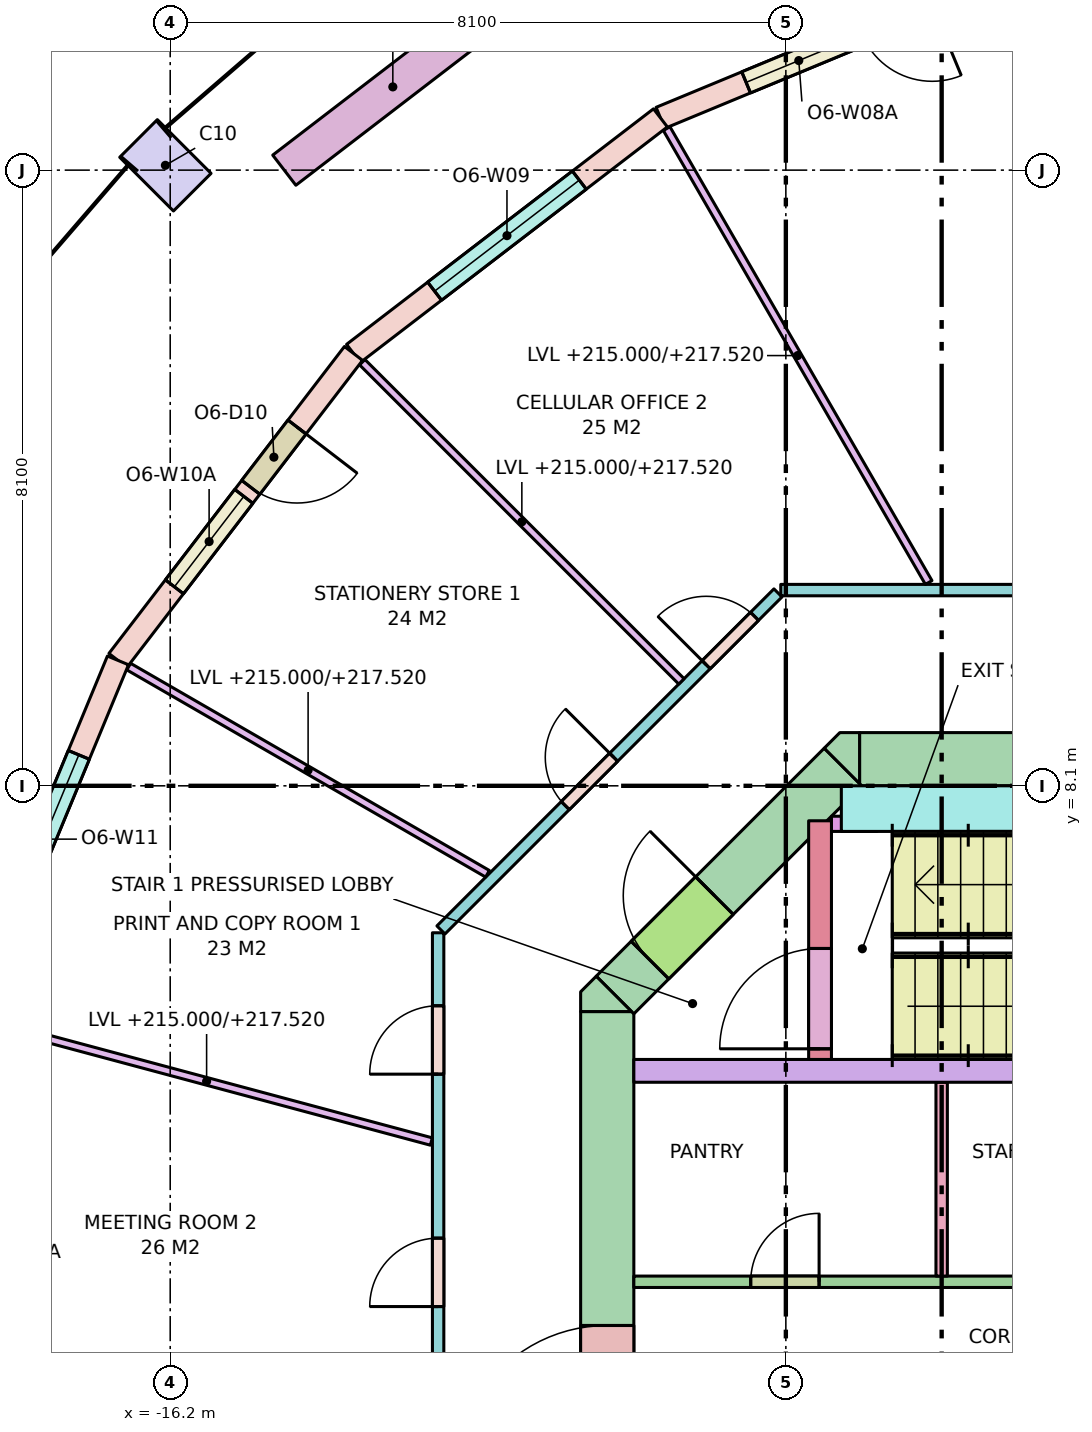
"""IFC4 building model, lengths in metres.
Left out: names, types, materials, properties, quantities, classifications, styles, units other than length and angle.
Written with IfcOpenShell. Run it as: python <this file> out.ifc"""

import sys

from ifc_helpers import new_model, si_unit, direction, frame, frame_2d, origin, origin_2d, place, context, subcontext, project, spatial, polyline, rectangle, outline, extrude, element, fill, save


model = new_model("IFC4")
c1 = context("Model", 3, precision=1e-05, world=origin(), true_north=direction((0.0, 1.0)))
c2 = subcontext(c1, "Body", "Model", "MODEL_VIEW")
j1 = project(units=[si_unit("LENGTHUNIT", "METRE"), si_unit("PLANEANGLEUNIT", "RADIAN")], contexts=[c1])
p1 = place(None, origin())
s1 = spatial("IfcSite", under=j1, at=p1, CompositionType="ELEMENT")
p2 = place(p1, origin())
s2 = spatial("IfcBuilding", under=s1, at=p2, CompositionType="ELEMENT")
p3 = place(p2, frame((0.0, 0.0, 215.0)))
s3 = spatial("IfcBuildingStorey", under=s2, at=p3, CompositionType="ELEMENT", Elevation=215.0)
p4 = place(p3, frame((-16.263, 16.263, 0.0), z_axis=(0.0, 0.0, 1.0), x_axis=(-0.707106781187, -0.707106781187, 0.0)))
e1 = element("IfcColumn", 1, at=p4, inside=s3, PredefinedType="COLUMN", context=c2, shape_type="SweptSolid", body=[
    extrude(rectangle(XDim=0.7, YDim=1.0, at=origin_2d()), origin(), (0.0, 0.0, 1.0), 3.7),
])
p5 = place(p3, frame((-7.13, 8.45, -0.28), z_axis=(0.0, 0.0, 1.0), x_axis=(1.0, 0.0, 0.0)))
e2 = element("IfcWall", 2, at=p5, inside=s3, PredefinedType="SHEAR", context=c2, shape_type="SweptSolid", body=[
    extrude(rectangle(XDim=14.26, YDim=0.7, at=frame_2d((7.13, 0.0))), origin(), (0.0, 0.0, 1.0), 3.7),
])
p6 = place(p5, frame((5.48, 0.0, 0.28)))
e3 = element("IfcOpeningElement", 3, at=p6, cuts=e2, PredefinedType="OPENING", context=c2, shape_type="SweptSolid", body=[
    extrude(rectangle(XDim=0.7, YDim=2.1, at=frame_2d((0.35, 1.05))), frame((0.0, 0.36, 0.0), z_axis=(0.0, -1.0, 0.0), x_axis=(1.0, 0.0, 0.0)), (0.0, 0.0, 1.0), 0.72),
])
p7 = place(p5, frame((7.155, 0.0, 0.28)))
e4 = element("IfcOpeningElement", 4, at=p7, cuts=e2, PredefinedType="OPENING", context=c2, shape_type="SweptSolid", body=[
    extrude(rectangle(XDim=0.9, YDim=2.1, at=frame_2d((0.45, 1.05))), frame((0.0, 0.36, 0.0), z_axis=(0.0, -1.0, 0.0), x_axis=(1.0, 0.0, 0.0)), (0.0, 0.0, 1.0), 0.72),
])
p8 = place(p3, frame((-10.45, -5.13, -0.28), z_axis=(0.0, 0.0, 1.0), x_axis=(0.0, 1.0, 0.0)))
e5 = element("IfcWall", 5, at=p8, inside=s3, PredefinedType="SHEAR", context=c2, shape_type="SweptSolid", body=[
    extrude(rectangle(XDim=10.26, YDim=0.7, at=frame_2d((5.13, 0.0))), origin(), (0.0, 0.0, 1.0), 3.7),
])
p9 = place(p8, frame((4.13, 0.0, 0.28)))
e6 = element("IfcOpeningElement", 6, at=p9, cuts=e5, PredefinedType="OPENING", context=c2, shape_type="SweptSolid", body=[
    extrude(rectangle(XDim=2.0, YDim=2.1, at=frame_2d((1.0, 1.05))), frame((0.0, 0.36, 0.0), z_axis=(0.0, -1.0, 0.0), x_axis=(1.0, 0.0, 0.0)), (0.0, 0.0, 1.0), 0.72),
])
p10 = place(p3, frame((-10.347, 5.347, -0.28), z_axis=(0.0, 0.0, 1.0), x_axis=(0.707106781187, 0.707106781187, 0.0)))
e7 = element("IfcWall", 7, at=p10, inside=s3, PredefinedType="SHEAR", context=c2, shape_type="SweptSolid", body=[
    extrude(rectangle(XDim=4.243, YDim=0.7, at=frame_2d((2.121, 0.0))), origin(), (0.0, 0.0, 1.0), 3.7),
])
p11 = place(p10, frame((0.65, 0.0, 0.28)))
e8 = element("IfcOpeningElement", 8, at=p11, cuts=e7, PredefinedType="OPENING", context=c2, shape_type="SweptSolid", body=[
    extrude(rectangle(XDim=1.2, YDim=2.1, at=frame_2d((0.6, 1.05))), frame((0.0, 0.36, 0.0), z_axis=(0.0, -1.0, 0.0), x_axis=(1.0, 0.0, 0.0)), (0.0, 0.0, 1.0), 0.72),
])
p12 = place(p3, frame((0.0, 0.0, -0.28)))
e9 = element("IfcWall", 9, at=p12, inside=s3, PredefinedType="SHEAR", context=c2, shape_type="SweptSolid", body=[
    extrude(outline(polyline([(-10.595, 5.595), (-10.595, 5.595), (-10.595, 5.595), (-10.13, 5.13), (-10.8, 5.13), (-10.8, 5.13), (-10.8, 5.39), (-10.595, 5.595)])), origin(), (0.0, 0.0, 1.0), 3.7),
])
p13 = place(p3, frame((0.0, 0.0, -0.28)))
e10 = element("IfcWall", 10, at=p13, inside=s3, PredefinedType="SHEAR", context=c2, shape_type="SweptSolid", body=[
    extrude(outline(polyline([(-7.39, 8.8), (-7.13, 8.8), (-7.13, 8.8), (-7.13, 8.13), (-7.595, 8.595), (-7.595, 8.595), (-7.595, 8.595), (-7.39, 8.8)])), origin(), (0.0, 0.0, 1.0), 3.7),
])
p14 = place(p3, frame((-10.1, 4.35, 0.0), z_axis=(0.0, 0.0, 1.0), x_axis=(1.0, 0.0, 0.0)))
e11 = element("IfcWall", 11, at=p14, inside=s3, PredefinedType="SOLIDWALL", context=c2, shape_type="SweptSolid", body=[
    extrude(rectangle(XDim=8.1, YDim=0.3, at=frame_2d((4.05, 0.0))), origin(), (0.0, 0.0, 1.0), 3.42),
])
p15 = place(p3, frame((-7.65, 4.5, 0.0), z_axis=(0.0, 0.0, 1.0), x_axis=(0.0, 1.0, 0.0)))
e12 = element("IfcWall", 12, at=p15, inside=s3, PredefinedType="SHEAR", context=c2, shape_type="SweptSolid", body=[
    extrude(rectangle(XDim=3.14, YDim=0.3, at=frame_2d((1.57, 0.0))), origin(), (0.0, 0.0, 1.0), 3.42),
])
p16 = place(p15, frame((0.14, 0.0, 0.0)))
e13 = element("IfcOpeningElement", 13, at=p16, cuts=e12, PredefinedType="OPENING", context=c2, shape_type="SweptSolid", body=[
    extrude(rectangle(XDim=1.32, YDim=2.1, at=frame_2d((0.66, 1.05))), frame((0.0, 0.16, 0.0), z_axis=(0.0, -1.0, 0.0), x_axis=(1.0, 0.0, 0.0)), (0.0, 0.0, 1.0), 0.32),
])
p17 = place(p3, frame((-7.37, 7.8, 0.0), z_axis=(0.0, 0.0, 1.0), x_axis=(1.0, 0.0, 0.0)))
e14 = element("IfcWall", 14, at=p17, inside=s3, PredefinedType="SHEAR", context=c2, shape_type="SweptSolid", body=[
    extrude(rectangle(XDim=5.37, YDim=0.6, at=frame_2d((2.685, 0.0))), origin(), (0.0, 0.0, 1.0), 3.42),
])
p18 = place(p3, frame((-7.5, 7.6, 0.0), z_axis=(0.0, 0.0, 1.0), x_axis=(1.0, 0.0, 0.0)))
e15 = element("IfcWall", 15, at=p18, inside=s3, PredefinedType="SHEAR", context=c2, shape_type="SweptSolid", body=[
    extrude(rectangle(XDim=0.6, YDim=0.2, at=frame_2d((0.3, 0.0))), origin(), (0.0, 0.0, 1.0), 3.42),
])
p19 = place(p3, frame((-5.047, 18.836, 0.0), z_axis=(0.0, 0.0, 1.0), x_axis=(-0.923862504675, -0.382724538613, 0.0)))
e16 = element("IfcWall", 16, at=p19, inside=s3, PredefinedType="STANDARD", context=c2, shape_type="SweptSolid", body=[
    extrude(rectangle(XDim=5.091, YDim=0.3, at=frame_2d((2.545, 0.0))), origin(), (0.0, 0.0, 1.0), 3.42),
])
p20 = place(p19, frame((1.22, 0.0, 0.0)))
e17 = element("IfcOpeningElement", 17, at=p20, cuts=e16, PredefinedType="OPENING", context=c2, shape_type="SweptSolid", body=[
    extrude(rectangle(XDim=1.0, YDim=2.4, at=frame_2d((0.5, 1.2))), frame((0.0, 0.16, 0.0), z_axis=(0.0, -1.0, 0.0), x_axis=(1.0, 0.0, 0.0)), (0.0, 0.0, 1.0), 0.32),
])
p21 = place(p19, frame((2.37, 0.0, 0.8)))
e18 = element("IfcOpeningElement", 18, at=p21, cuts=e16, PredefinedType="OPENING", context=c2, shape_type="SweptSolid", body=[
    extrude(rectangle(XDim=1.5, YDim=2.4, at=frame_2d((0.75, 1.2))), frame((0.0, 0.16, 0.0), z_axis=(0.0, -1.0, 0.0), x_axis=(1.0, 0.0, 0.0)), (0.0, 0.0, 1.0), 0.32),
])
p22 = place(p3, frame((-9.75, 16.887, 0.0), z_axis=(0.0, 0.0, 1.0), x_axis=(-0.79335619014, -0.608757714995, 0.0)))
e19 = element("IfcWall", 19, at=p22, inside=s3, PredefinedType="STANDARD", context=c2, shape_type="SweptSolid", body=[
    extrude(rectangle(XDim=5.091, YDim=0.3, at=frame_2d((2.545, 0.0))), origin(), (0.0, 0.0, 1.0), 3.42),
])
p23 = place(p22, frame((1.345, 0.0, 0.8)))
e20 = element("IfcOpeningElement", 20, at=p23, cuts=e19, PredefinedType="OPENING", context=c2, shape_type="SweptSolid", body=[
    extrude(rectangle(XDim=2.4, YDim=2.4, at=frame_2d((1.2, 1.2))), frame((0.0, 0.16, 0.0), z_axis=(0.0, -1.0, 0.0), x_axis=(1.0, 0.0, 0.0)), (0.0, 0.0, 1.0), 0.32),
])
p24 = place(p3, frame((-13.789, 13.789, 0.0), z_axis=(0.0, 0.0, 1.0), x_axis=(-0.608757714995, -0.79335619014, 0.0)))
e21 = element("IfcWall", 21, at=p24, inside=s3, PredefinedType="STANDARD", context=c2, shape_type="SweptSolid", body=[
    extrude(rectangle(XDim=5.091, YDim=0.3, at=frame_2d((2.545, 0.0))), origin(), (0.0, 0.0, 1.0), 3.42),
])
p25 = place(p24, frame((1.22, 0.0, 0.0)))
e22 = element("IfcOpeningElement", 22, at=p25, cuts=e21, PredefinedType="OPENING", context=c2, shape_type="SweptSolid", body=[
    extrude(rectangle(XDim=1.0, YDim=2.4, at=frame_2d((0.5, 1.2))), frame((0.0, 0.16, 0.0), z_axis=(0.0, -1.0, 0.0), x_axis=(1.0, 0.0, 0.0)), (0.0, 0.0, 1.0), 0.32),
])
p26 = place(p24, frame((2.37, 0.0, 0.8)))
e23 = element("IfcOpeningElement", 23, at=p26, cuts=e21, PredefinedType="OPENING", context=c2, shape_type="SweptSolid", body=[
    extrude(rectangle(XDim=1.5, YDim=2.4, at=frame_2d((0.75, 1.2))), frame((0.0, 0.16, 0.0), z_axis=(0.0, -1.0, 0.0), x_axis=(1.0, 0.0, 0.0)), (0.0, 0.0, 1.0), 0.32),
])
p27 = place(p3, frame((-16.887, 9.75, 0.0), z_axis=(0.0, 0.0, 1.0), x_axis=(-0.382724538613, -0.923862504675, 0.0)))
e24 = element("IfcWall", 24, at=p27, inside=s3, PredefinedType="STANDARD", context=c2, shape_type="SweptSolid", body=[
    extrude(rectangle(XDim=5.091, YDim=0.3, at=frame_2d((2.545, 0.0))), origin(), (0.0, 0.0, 1.0), 3.42),
])
p28 = place(p27, frame((1.345, 0.0, 0.8)))
e25 = element("IfcOpeningElement", 25, at=p28, cuts=e24, PredefinedType="OPENING", context=c2, shape_type="SweptSolid", body=[
    extrude(rectangle(XDim=2.4, YDim=2.4, at=frame_2d((1.2, 1.2))), frame((0.0, 0.16, 0.0), z_axis=(0.0, -1.0, 0.0), x_axis=(1.0, 0.0, 0.0)), (0.0, 0.0, 1.0), 0.32),
])
p29 = place(p3, frame((-11.843, 18.391, 0.0), z_axis=(0.0, 0.0, 1.0), x_axis=(-0.793326845617, -0.608795955984, 0.0)))
e26 = element("IfcWall", 26, at=p29, inside=s3, PredefinedType="PARAPET", context=c2, shape_type="SweptSolid", body=[
    extrude(rectangle(XDim=3.6, YDim=0.5, at=frame_2d((1.8, 0.0))), origin(), (0.0, 0.0, 1.0), 0.9),
])
p30 = place(p3, frame((-6.05, 1.65, 0.0), z_axis=(0.0, 0.0, 1.0), x_axis=(0.0, 1.0, 0.0)))
e27 = element("IfcWall", 27, at=p30, inside=s3, PredefinedType="PARTITIONING", context=c2, shape_type="SweptSolid", body=[
    extrude(rectangle(XDim=2.55, YDim=0.15, at=frame_2d((1.275, 0.0))), origin(), (0.0, 0.0, 1.0), 3.42),
])
p31 = place(p3, frame((-10.1, 1.575, 0.0), z_axis=(0.0, 0.0, 1.0), x_axis=(1.0, 0.0, 0.0)))
e28 = element("IfcWall", 28, at=p31, inside=s3, PredefinedType="PARTITIONING", context=c2, shape_type="SweptSolid", body=[
    extrude(rectangle(XDim=8.1, YDim=0.15, at=frame_2d((4.05, 0.0))), origin(), (0.0, 0.0, 1.0), 3.42),
])
p32 = place(p31, frame((1.538, 0.0, 0.0)))
e29 = element("IfcOpeningElement", 29, at=p32, cuts=e28, PredefinedType="OPENING", context=c2, shape_type="SweptSolid", body=[
    extrude(rectangle(XDim=0.9, YDim=2.1, at=frame_2d((0.45, 1.05))), frame((0.0, 0.085, 0.0), z_axis=(0.0, -1.0, 0.0), x_axis=(1.0, 0.0, 0.0)), (0.0, 0.0, 1.0), 0.17),
])
p33 = place(p31, frame((5.663, 0.0, 0.0)))
e30 = element("IfcOpeningElement", 30, at=p33, cuts=e28, PredefinedType="OPENING", context=c2, shape_type="SweptSolid", body=[
    extrude(rectangle(XDim=0.9, YDim=2.1, at=frame_2d((0.45, 1.05))), frame((0.0, 0.085, 0.0), z_axis=(0.0, -1.0, 0.0), x_axis=(1.0, 0.0, 0.0)), (0.0, 0.0, 1.0), 0.17),
])
p34 = place(p3, frame((-12.675, -6.167, 0.0), z_axis=(0.0, 0.0, 1.0), x_axis=(0.0, 1.0, 0.0)))
e31 = element("IfcWall", 31, at=p34, inside=s3, PredefinedType="PARTITIONING", context=c2, shape_type="SweptSolid", body=[
    extrude(rectangle(XDim=12.333, YDim=0.15, at=frame_2d((6.167, 0.0))), origin(), (0.0, 0.0, 1.0), 2.52),
])
p35 = place(p34, frame((10.473, 0.0, 0.0)))
e32 = element("IfcOpeningElement", 32, at=p35, cuts=e31, PredefinedType="OPENING", context=c2, shape_type="SweptSolid", body=[
    extrude(rectangle(XDim=0.9, YDim=2.1, at=frame_2d((0.45, 1.05))), frame((0.0, 0.085, 0.0), z_axis=(0.0, -1.0, 0.0), x_axis=(1.0, 0.0, 0.0)), (0.0, 0.0, 1.0), 0.17),
])
p36 = place(p34, frame((7.416, 0.0, 0.0)))
e33 = element("IfcOpeningElement", 33, at=p36, cuts=e31, PredefinedType="OPENING", context=c2, shape_type="SweptSolid", body=[
    extrude(rectangle(XDim=0.9, YDim=2.1, at=frame_2d((0.45, 1.05))), frame((0.0, 0.085, 0.0), z_axis=(0.0, -1.0, 0.0), x_axis=(1.0, 0.0, 0.0)), (0.0, 0.0, 1.0), 0.17),
])
p37 = place(p34, frame((4.018, 0.0, 0.0)))
e34 = element("IfcOpeningElement", 34, at=p37, cuts=e31, PredefinedType="OPENING", context=c2, shape_type="SweptSolid", body=[
    extrude(rectangle(XDim=0.9, YDim=2.1, at=frame_2d((0.45, 1.05))), frame((0.0, 0.085, 0.0), z_axis=(0.0, -1.0, 0.0), x_axis=(1.0, 0.0, 0.0)), (0.0, 0.0, 1.0), 0.17),
])
p38 = place(p34, frame((0.46, 0.0, 0.0)))
e35 = element("IfcOpeningElement", 35, at=p38, cuts=e31, PredefinedType="OPENING", context=c2, shape_type="SweptSolid", body=[
    extrude(rectangle(XDim=1.8, YDim=2.1, at=frame_2d((0.9, 1.05))), frame((0.0, 0.085, 0.0), z_axis=(0.0, -1.0, 0.0), x_axis=(1.0, 0.0, 0.0)), (0.0, 0.0, 1.0), 0.17),
])
p39 = place(p3, frame((-12.638, 6.204, 0.0), z_axis=(0.0, 0.0, 1.0), x_axis=(0.707106781187, 0.707106781187, 0.0)))
e36 = element("IfcWall", 36, at=p39, inside=s3, PredefinedType="PARTITIONING", context=c2, shape_type="SweptSolid", body=[
    extrude(rectangle(XDim=6.271, YDim=0.15, at=frame_2d((3.135, 0.0))), origin(), (0.0, 0.0, 1.0), 2.52),
])
p40 = place(p39, frame((4.935, 0.0, 0.0)))
e37 = element("IfcOpeningElement", 37, at=p40, cuts=e36, PredefinedType="OPENING", context=c2, shape_type="SweptSolid", body=[
    extrude(rectangle(XDim=0.9, YDim=2.1, at=frame_2d((0.45, 1.05))), frame((0.0, 0.085, 0.0), z_axis=(0.0, -1.0, 0.0), x_axis=(1.0, 0.0, 0.0)), (0.0, 0.0, 1.0), 0.17),
])
p41 = place(p39, frame((2.314, 0.0, 0.0)))
e38 = element("IfcOpeningElement", 38, at=p41, cuts=e36, PredefinedType="OPENING", context=c2, shape_type="SweptSolid", body=[
    extrude(rectangle(XDim=0.9, YDim=2.1, at=frame_2d((0.45, 1.05))), frame((0.0, 0.085, 0.0), z_axis=(0.0, -1.0, 0.0), x_axis=(1.0, 0.0, 0.0)), (0.0, 0.0, 1.0), 0.17),
])
p42 = place(p3, frame((-8.167, 10.675, 0.0), z_axis=(0.0, 0.0, 1.0), x_axis=(1.0, 0.0, 0.0)))
e39 = element("IfcWall", 39, at=p42, inside=s3, PredefinedType="PARTITIONING", context=c2, shape_type="SweptSolid", body=[
    extrude(rectangle(XDim=16.333, YDim=0.15, at=frame_2d((8.167, 0.0))), origin(), (0.0, 0.0, 1.0), 2.52),
])
p43 = place(p42, frame((9.148, 0.0, 0.0)))
e40 = element("IfcOpeningElement", 40, at=p43, cuts=e39, PredefinedType="OPENING", context=c2, shape_type="SweptSolid", body=[
    extrude(rectangle(XDim=0.9, YDim=2.1, at=frame_2d((0.45, 1.05))), frame((0.0, 0.085, 0.0), z_axis=(0.0, -1.0, 0.0), x_axis=(1.0, 0.0, 0.0)), (0.0, 0.0, 1.0), 0.17),
])
p44 = place(p42, frame((4.581, 0.0, 0.0)))
e41 = element("IfcOpeningElement", 41, at=p44, cuts=e39, PredefinedType="OPENING", context=c2, shape_type="SweptSolid", body=[
    extrude(rectangle(XDim=1.0, YDim=2.1, at=frame_2d((0.5, 1.05))), frame((0.0, 0.085, 0.0), z_axis=(0.0, -1.0, 0.0), x_axis=(1.0, 0.0, 0.0)), (0.0, 0.0, 1.0), 0.17),
])
p45 = place(p3, frame((-6.221, 10.775, 0.0), z_axis=(0.0, 0.0, 1.0), x_axis=(-0.500015661236, 0.866016361577, 0.0)))
e42 = element("IfcWall", 42, at=p45, inside=s3, PredefinedType="PARTITIONING", context=c2, shape_type="SweptSolid", body=[
    extrude(rectangle(XDim=6.895, YDim=0.1, at=frame_2d((3.448, 0.0))), origin(), (0.0, 0.0, 1.0), 2.52),
])
p46 = place(p3, frame((-9.474, 9.474, 0.0), z_axis=(0.0, 0.0, 1.0), x_axis=(-0.707106781187, 0.707106781187, 0.0)))
e43 = element("IfcWall", 43, at=p46, inside=s3, PredefinedType="PARTITIONING", context=c2, shape_type="SweptSolid", body=[
    extrude(rectangle(XDim=5.938, YDim=0.1, at=frame_2d((2.969, 0.0))), origin(), (0.0, 0.0, 1.0), 2.52),
])
p47 = place(p3, frame((-12.025, 6.943, 0.0), z_axis=(0.0, 0.0, 1.0), x_axis=(-0.866029712004, 0.499992537871, 0.0)))
e44 = element("IfcWall", 44, at=p47, inside=s3, PredefinedType="PARTITIONING", context=c2, shape_type="SweptSolid", body=[
    extrude(rectangle(XDim=5.451, YDim=0.1, at=frame_2d((2.726, 0.0))), origin(), (0.0, 0.0, 1.0), 2.52),
])
p48 = place(p3, frame((-12.764, 3.42, 0.0), z_axis=(0.0, 0.0, 1.0), x_axis=(-0.965925800266, 0.258819142221, 0.0)))
e45 = element("IfcWall", 45, at=p48, inside=s3, PredefinedType="PARTITIONING", context=c2, shape_type="SweptSolid", body=[
    extrude(rectangle(XDim=6.122, YDim=0.1, at=frame_2d((3.061, 0.0))), origin(), (0.0, 0.0, 1.0), 2.52),
])
p49 = place(p21, origin())
e46 = element("IfcWindow", 46, at=p49, inside=s3, PartitioningType="SINGLE_PANEL", PredefinedType="WINDOW", context=c2, shape_type="SweptSolid", body=[
    extrude(rectangle(XDim=1.5, YDim=2.4, at=frame_2d((0.75, 1.2))), frame((0.0, 0.03, 0.0), z_axis=(0.0, -1.0, 0.0), x_axis=(1.0, 0.0, 0.0)), (0.0, 0.0, 1.0), 0.06),
])
fill(e18, e46)
p50 = place(p23, origin())
e47 = element("IfcWindow", 47, at=p50, inside=s3, PartitioningType="SINGLE_PANEL", PredefinedType="WINDOW", context=c2, shape_type="SweptSolid", body=[
    extrude(rectangle(XDim=2.4, YDim=2.4, at=frame_2d((1.2, 1.2))), frame((0.0, 0.03, 0.0), z_axis=(0.0, -1.0, 0.0), x_axis=(1.0, 0.0, 0.0)), (0.0, 0.0, 1.0), 0.06),
])
fill(e20, e47)
p51 = place(p25, origin())
e48 = element("IfcDoor", 48, at=p51, inside=s3, OperationType="SINGLE_SWING_LEFT", PredefinedType="DOOR", context=c2, shape_type="SweptSolid", body=[
    extrude(rectangle(XDim=1.0, YDim=2.4, at=frame_2d((0.5, 1.2))), frame((0.0, 0.025, 0.0), z_axis=(0.0, -1.0, 0.0), x_axis=(1.0, 0.0, 0.0)), (0.0, 0.0, 1.0), 0.05),
])
fill(e22, e48)
p52 = place(p26, origin())
e49 = element("IfcWindow", 49, at=p52, inside=s3, PartitioningType="SINGLE_PANEL", PredefinedType="WINDOW", context=c2, shape_type="SweptSolid", body=[
    extrude(rectangle(XDim=1.5, YDim=2.4, at=frame_2d((0.75, 1.2))), frame((0.0, 0.03, 0.0), z_axis=(0.0, -1.0, 0.0), x_axis=(1.0, 0.0, 0.0)), (0.0, 0.0, 1.0), 0.06),
])
fill(e23, e49)
p53 = place(p28, origin())
e50 = element("IfcWindow", 50, at=p53, inside=s3, PartitioningType="SINGLE_PANEL", PredefinedType="WINDOW", context=c2, shape_type="SweptSolid", body=[
    extrude(rectangle(XDim=2.4, YDim=2.4, at=frame_2d((1.2, 1.2))), frame((0.0, 0.03, 0.0), z_axis=(0.0, -1.0, 0.0), x_axis=(1.0, 0.0, 0.0)), (0.0, 0.0, 1.0), 0.06),
])
fill(e25, e50)
p54 = place(p16, origin())
e51 = element("IfcDoor", 51, at=p54, inside=s3, OperationType="DOUBLE_DOOR_SINGLE_SWING", PredefinedType="DOOR", context=c2, shape_type="SweptSolid", body=[
    extrude(rectangle(XDim=1.32, YDim=2.1, at=frame_2d((0.66, 1.05))), frame((0.0, 0.025, 0.0), z_axis=(0.0, -1.0, 0.0), x_axis=(1.0, 0.0, 0.0)), (0.0, 0.0, 1.0), 0.05),
])
fill(e13, e51)
p55 = place(p11, origin())
e52 = element("IfcDoor", 52, at=p55, inside=s3, OperationType="SINGLE_SWING_RIGHT", PredefinedType="DOOR", context=c2, shape_type="SweptSolid", body=[
    extrude(rectangle(XDim=1.2, YDim=2.1, at=frame_2d((0.6, 1.05))), frame((0.0, 0.025, 0.0), z_axis=(0.0, -1.0, 0.0), x_axis=(1.0, 0.0, 0.0)), (0.0, 0.0, 1.0), 0.05),
])
fill(e8, e52)
p56 = place(p9, origin())
e53 = element("IfcDoor", 53, at=p56, inside=s3, OperationType="DOUBLE_DOOR_SINGLE_SWING", PredefinedType="DOOR", context=c2, shape_type="SweptSolid", body=[
    extrude(rectangle(XDim=2.0, YDim=2.1, at=frame_2d((1.0, 1.05))), frame((0.0, 0.025, 0.0), z_axis=(0.0, -1.0, 0.0), x_axis=(1.0, 0.0, 0.0)), (0.0, 0.0, 1.0), 0.05),
])
fill(e6, e53)
p57 = place(p32, origin())
e54 = element("IfcDoor", 54, at=p57, inside=s3, OperationType="SINGLE_SWING_RIGHT", PredefinedType="DOOR", context=c2, shape_type="SweptSolid", body=[
    extrude(rectangle(XDim=0.9, YDim=2.1, at=frame_2d((0.45, 1.05))), frame((0.0, 0.025, 0.0), z_axis=(0.0, -1.0, 0.0), x_axis=(1.0, 0.0, 0.0)), (0.0, 0.0, 1.0), 0.05),
])
fill(e29, e54)
p58 = place(p40, origin())
e55 = element("IfcDoor", 55, at=p58, inside=s3, OperationType="SINGLE_SWING_LEFT", PredefinedType="DOOR", context=c2, shape_type="SweptSolid", body=[
    extrude(rectangle(XDim=0.9, YDim=2.1, at=frame_2d((0.45, 1.05))), frame((0.0, 0.025, 0.0), z_axis=(0.0, -1.0, 0.0), x_axis=(1.0, 0.0, 0.0)), (0.0, 0.0, 1.0), 0.05),
])
fill(e37, e55)
p59 = place(p41, origin())
e56 = element("IfcDoor", 56, at=p59, inside=s3, OperationType="SINGLE_SWING_RIGHT", PredefinedType="DOOR", context=c2, shape_type="SweptSolid", body=[
    extrude(rectangle(XDim=0.9, YDim=2.1, at=frame_2d((0.45, 1.05))), frame((0.0, 0.025, 0.0), z_axis=(0.0, -1.0, 0.0), x_axis=(1.0, 0.0, 0.0)), (0.0, 0.0, 1.0), 0.05),
])
fill(e38, e56)
p60 = place(p35, origin())
e57 = element("IfcDoor", 57, at=p60, inside=s3, OperationType="SINGLE_SWING_LEFT", PredefinedType="DOOR", context=c2, shape_type="SweptSolid", body=[
    extrude(rectangle(XDim=0.9, YDim=2.1, at=frame_2d((0.45, 1.05))), frame((0.0, 0.025, 0.0), z_axis=(0.0, -1.0, 0.0), x_axis=(1.0, 0.0, 0.0)), (0.0, 0.0, 1.0), 0.05),
])
fill(e32, e57)
p61 = place(p36, origin())
e58 = element("IfcDoor", 58, at=p61, inside=s3, OperationType="SINGLE_SWING_LEFT", PredefinedType="DOOR", context=c2, shape_type="SweptSolid", body=[
    extrude(rectangle(XDim=0.9, YDim=2.1, at=frame_2d((0.45, 1.05))), frame((0.0, 0.025, 0.0), z_axis=(0.0, -1.0, 0.0), x_axis=(1.0, 0.0, 0.0)), (0.0, 0.0, 1.0), 0.05),
])
fill(e33, e58)
save(model, sys.argv[1])
